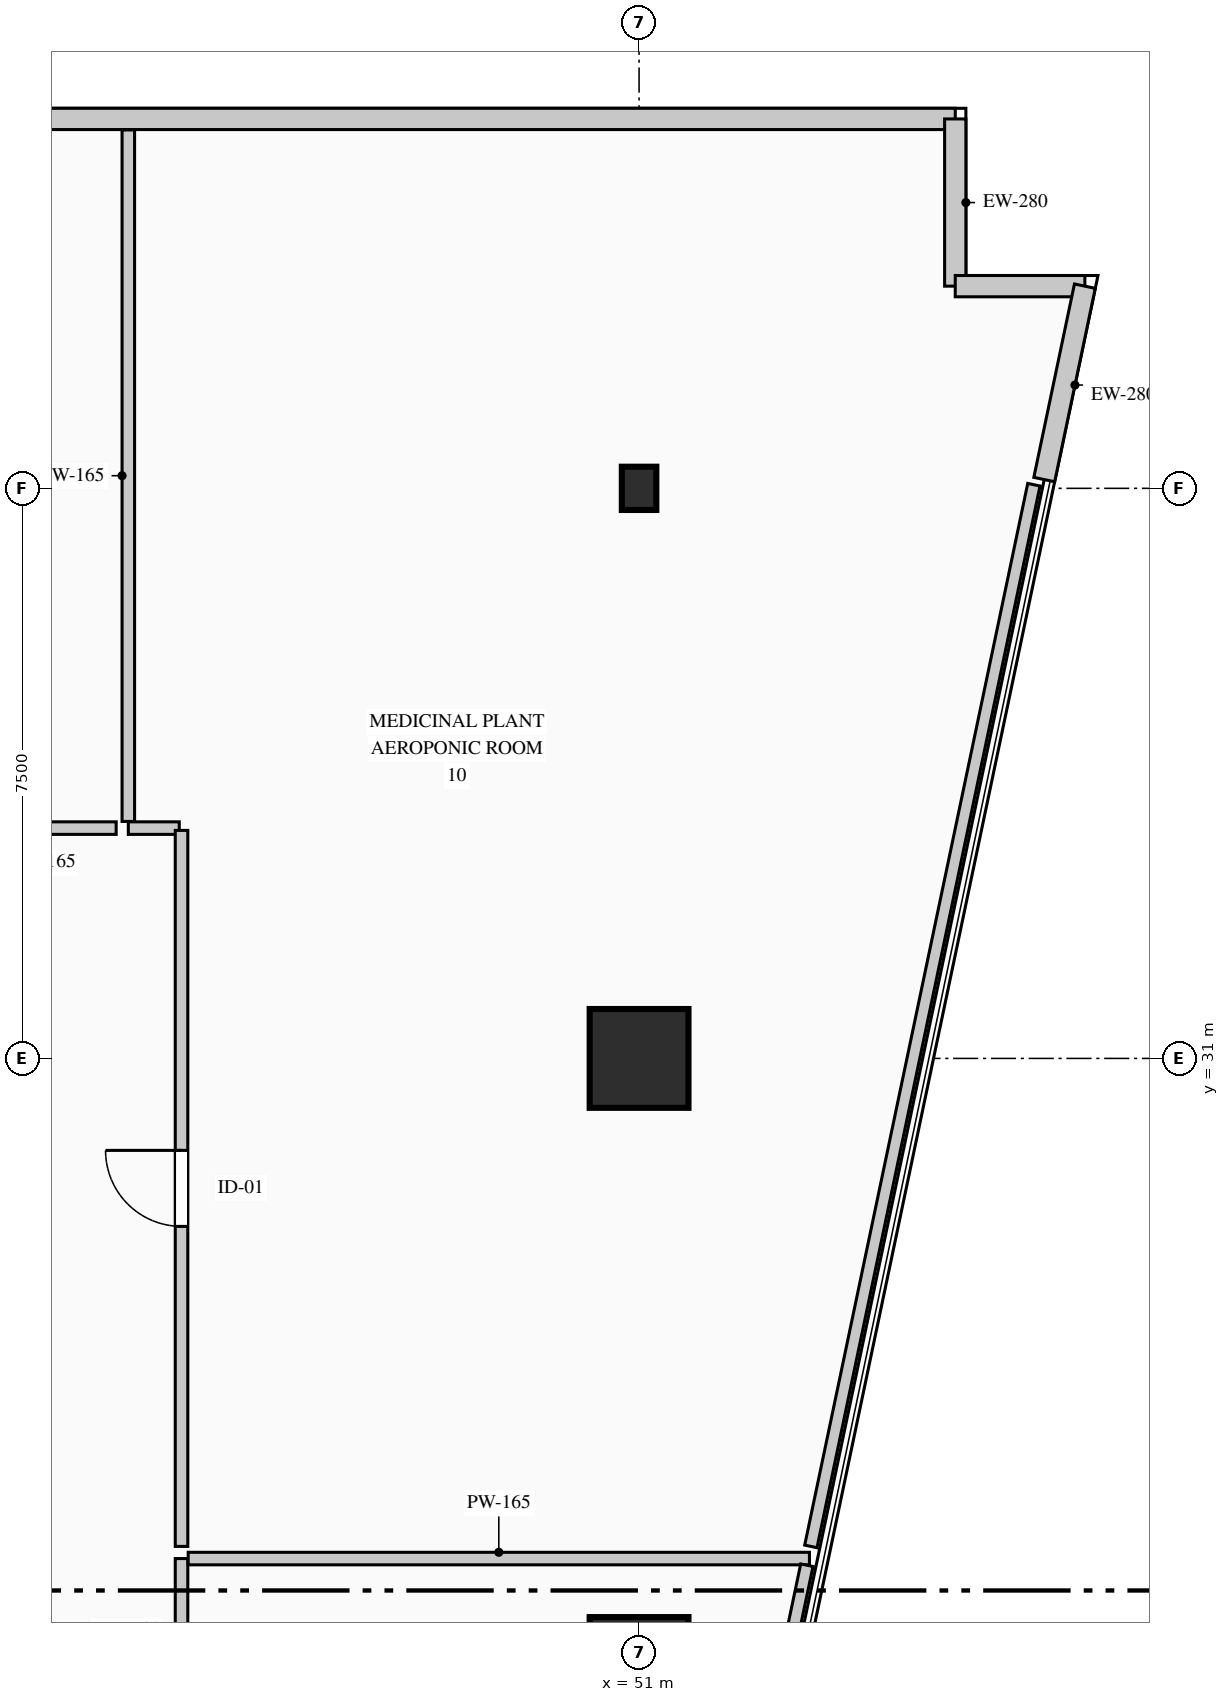
"""IFC4 building model, lengths in metres.
Left out: names, types, materials, properties, quantities, classifications, styles, units other than length and angle.
Written with IfcOpenShell. Run it as: python <this file> out.ifc"""

import sys

from ifc_helpers import new_model, si_unit, direction, frame, frame_2d, origin, origin_2d, place, context, subcontext, project, spatial, rectangle, i_section, extrude, element, fill, save


model = new_model("IFC4")
c1 = context("Model", 3, precision=1e-05, world=origin(), true_north=direction((0.0, 1.0)))
c2 = subcontext(c1, "Body", "Model", "MODEL_VIEW")
j1 = project(units=[si_unit("LENGTHUNIT", "METRE"), si_unit("PLANEANGLEUNIT", "RADIAN")], contexts=[c1])
p1 = place(None, origin())
s1 = spatial("IfcSite", under=j1, at=p1, CompositionType="ELEMENT")
p2 = place(p1, origin())
s2 = spatial("IfcBuilding", under=s1, at=p2, CompositionType="ELEMENT")
p3 = place(p2, frame((0.0, 0.0, 66.6)))
s3 = spatial("IfcBuildingStorey", under=s2, at=p3, CompositionType="ELEMENT", Elevation=66.6)
for number, where, z_axis, x_axis in (
    (1, (51.0, 23.0, 0.0), (0.0, 0.0, 1.0), (1.0, 0.0, 0.0)),
    (2, (51.0, 31.0, 0.0), (0.0, 0.0, 1.0), (1.0, 0.0, 0.0)),
):
    element("IfcColumn", number, at=place(p3, frame(where, z_axis=z_axis, x_axis=x_axis)), inside=s3, PredefinedType="COLUMN", context=c2, shape_type="SweptSolid", body=[
        extrude(rectangle(XDim=1.3, YDim=1.3, at=origin_2d()), origin(), (0.0, 0.0, 1.0), 4.4),
    ])
p4 = place(p3, frame((51.0, 38.5, 0.0), z_axis=(0.0, 0.0, 1.0), x_axis=(1.0, 0.0, 0.0)))
e3 = element("IfcColumn", 3, at=p4, inside=s3, PredefinedType="COLUMN", context=c2, shape_type="SweptSolid", body=[
    extrude(i_section(OverallWidth=0.454, OverallDepth=0.569, WebThickness=0.078, FlangeThickness=0.08, FilletRadius=0.015, at=origin_2d()), origin(), (0.0, 0.0, 1.0), 4.4),
])
p5 = place(p3, frame((4.84, 43.36, 0.0), z_axis=(0.0, 0.0, 1.0), x_axis=(1.0, 0.0, 0.0)))
e4 = element("IfcWall", 4, at=p5, inside=s3, PredefinedType="STANDARD", context=c2, shape_type="SweptSolid", body=[
    extrude(rectangle(XDim=50.32, YDim=0.28, at=frame_2d((25.16, 0.0))), origin(), (0.0, 0.0, 1.0), 4.1),
])
p6 = place(p5, frame((24.26, 0.0, 0.9)))
e5 = element("IfcOpeningElement", 5, at=p6, cuts=e4, PredefinedType="OPENING", context=c2, shape_type="SweptSolid", body=[
    extrude(rectangle(XDim=1.8, YDim=2.1, at=frame_2d((0.9, 1.05))), frame((0.0, 0.15, 0.0), z_axis=(0.0, -1.0, 0.0), x_axis=(1.0, 0.0, 0.0)), (0.0, 0.0, 1.0), 0.3),
])
p7 = place(p3, frame((55.16, 43.36, 0.0), z_axis=(0.0, 0.0, 1.0), x_axis=(0.0, -1.0, 0.0)))
e6 = element("IfcWall", 6, at=p7, inside=s3, PredefinedType="STANDARD", context=c2, shape_type="SweptSolid", body=[
    extrude(rectangle(XDim=2.2, YDim=0.28, at=frame_2d((1.1, 0.0))), origin(), (0.0, 0.0, 1.0), 4.1),
])
p8 = place(p3, frame((55.16, 41.16, 0.0), z_axis=(0.0, 0.0, 1.0), x_axis=(1.0, 0.0, 0.0)))
e7 = element("IfcWall", 7, at=p8, inside=s3, PredefinedType="STANDARD", context=c2, shape_type="SweptSolid", body=[
    extrude(rectangle(XDim=1.705, YDim=0.28, at=frame_2d((0.853, 0.0))), origin(), (0.0, 0.0, 1.0), 4.1),
])
p9 = place(p3, frame((56.865, 41.16, 0.0), z_axis=(0.0, 0.0, 1.0), x_axis=(-0.205551409765, -0.978646319128, 0.0)))
e8 = element("IfcWall", 8, at=p9, inside=s3, PredefinedType="STANDARD", context=c2, shape_type="SweptSolid", body=[
    extrude(rectangle(XDim=2.6, YDim=0.28, at=frame_2d((1.3, 0.0))), origin(), (0.0, 0.0, 1.0), 4.1),
])
p10 = place(p3, frame((44.98, 18.73, 0.0), z_axis=(0.0, 0.0, 1.0), x_axis=(0.0, 1.0, 0.0)))
e9 = element("IfcWall", 9, at=p10, inside=s3, PredefinedType="PARTITIONING", context=c2, shape_type="SweptSolid", body=[
    extrude(rectangle(XDim=5.69, YDim=0.165, at=frame_2d((2.845, 0.0))), origin(), (0.0, 0.0, 1.0), 4.1),
])
p11 = place(p10, frame((2.345, 0.0, 0.0)))
e10 = element("IfcOpeningElement", 10, at=p11, cuts=e9, PredefinedType="OPENING", context=c2, shape_type="SweptSolid", body=[
    extrude(rectangle(XDim=1.0, YDim=2.15, at=frame_2d((0.5, 1.075))), frame((0.0, 0.093, 0.0), z_axis=(0.0, -1.0, 0.0), x_axis=(1.0, 0.0, 0.0)), (0.0, 0.0, 1.0), 0.185),
])
p12 = place(p3, frame((45.067, 24.42, 0.0), z_axis=(0.0, 0.0, 1.0), x_axis=(1.0, 0.0, 0.0)))
e11 = element("IfcWall", 11, at=p12, inside=s3, PredefinedType="PARTITIONING", context=c2, shape_type="SweptSolid", body=[
    extrude(rectangle(XDim=8.174, YDim=0.165, at=frame_2d((4.087, 0.0))), origin(), (0.0, 0.0, 1.0), 4.1),
])
p13 = place(p3, frame((53.208, 24.333, 0.0), z_axis=(0.0, 0.0, 1.0), x_axis=(-0.20551396666, -0.978654182798, 0.0)))
e12 = element("IfcWall", 12, at=p13, inside=s3, PredefinedType="PARTITIONING", context=c2, shape_type="SweptSolid", body=[
    extrude(rectangle(XDim=5.725, YDim=0.165, at=frame_2d((2.862, 0.0))), origin(), (0.0, 0.0, 1.0), 4.1),
])
p14 = place(p3, frame((44.95, 34.03, 0.0), z_axis=(0.0, 0.0, 1.0), x_axis=(-1.0, 0.0, 0.0)))
e13 = element("IfcWall", 13, at=p14, inside=s3, PredefinedType="PARTITIONING", context=c2, shape_type="SweptSolid", body=[
    extrude(rectangle(XDim=0.67, YDim=0.165, at=frame_2d((0.335, 0.0))), origin(), (0.0, 0.0, 1.0), 4.1),
])
p15 = place(p3, frame((44.28, 34.117, 0.0), z_axis=(0.0, 0.0, 1.0), x_axis=(0.0, 1.0, 0.0)))
e14 = element("IfcWall", 14, at=p15, inside=s3, PredefinedType="PARTITIONING", context=c2, shape_type="SweptSolid", body=[
    extrude(rectangle(XDim=9.098, YDim=0.165, at=frame_2d((4.549, 0.0))), origin(), (0.0, 0.0, 1.0), 3.725),
])
p16 = place(p3, frame((56.194, 38.548, 0.0), z_axis=(0.0, 0.0, 1.0), x_axis=(-0.205594071113, -0.978637357719, 0.0)))
e15 = element("IfcWall", 15, at=p16, inside=s3, PredefinedType="PARTITIONING", context=c2, shape_type="SweptSolid", body=[
    extrude(rectangle(XDim=14.272, YDim=0.165, at=frame_2d((7.136, 0.0))), origin(), (0.0, 0.0, 1.0), 4.1),
])
p17 = place(p3, frame((44.98, 24.58, 0.0), z_axis=(0.0, 0.0, 1.0), x_axis=(0.0, 1.0, 0.0)))
e16 = element("IfcWall", 16, at=p17, inside=s3, PredefinedType="PARTITIONING", context=c2, shape_type="SweptSolid", body=[
    extrude(rectangle(XDim=9.42, YDim=0.165, at=frame_2d((4.71, 0.0))), origin(), (0.0, 0.0, 1.0), 3.725),
])
p18 = place(p17, frame((4.21, 0.0, 0.0)))
e17 = element("IfcOpeningElement", 17, at=p18, cuts=e16, PredefinedType="OPENING", context=c2, shape_type="SweptSolid", body=[
    extrude(rectangle(XDim=1.0, YDim=2.15, at=frame_2d((0.5, 1.075))), frame((0.0, 0.093, 0.0), z_axis=(0.0, -1.0, 0.0), x_axis=(1.0, 0.0, 0.0)), (0.0, 0.0, 1.0), 0.185),
])
p19 = place(p3, frame((44.12, 34.03, 0.0), z_axis=(0.0, 0.0, 1.0), x_axis=(-1.0, 0.0, 0.0)))
e18 = element("IfcWall", 18, at=p19, inside=s3, PredefinedType="PARTITIONING", context=c2, shape_type="SweptSolid", body=[
    extrude(rectangle(XDim=1.9, YDim=0.165, at=frame_2d((0.95, 0.0))), origin(), (0.0, 0.0, 1.0), 4.1),
])
p20 = place(p18, origin())
e19 = element("IfcDoor", 19, at=p20, inside=s3, OperationType="SINGLE_SWING_RIGHT", PredefinedType="DOOR", context=c2, shape_type="SweptSolid", body=[
    extrude(rectangle(XDim=1.0, YDim=2.15, at=frame_2d((0.5, 1.075))), frame((0.0, 0.025, 0.0), z_axis=(0.0, -1.0, 0.0), x_axis=(1.0, 0.0, 0.0)), (0.0, 0.0, 1.0), 0.05),
])
fill(e17, e19)
save(model, sys.argv[1])
